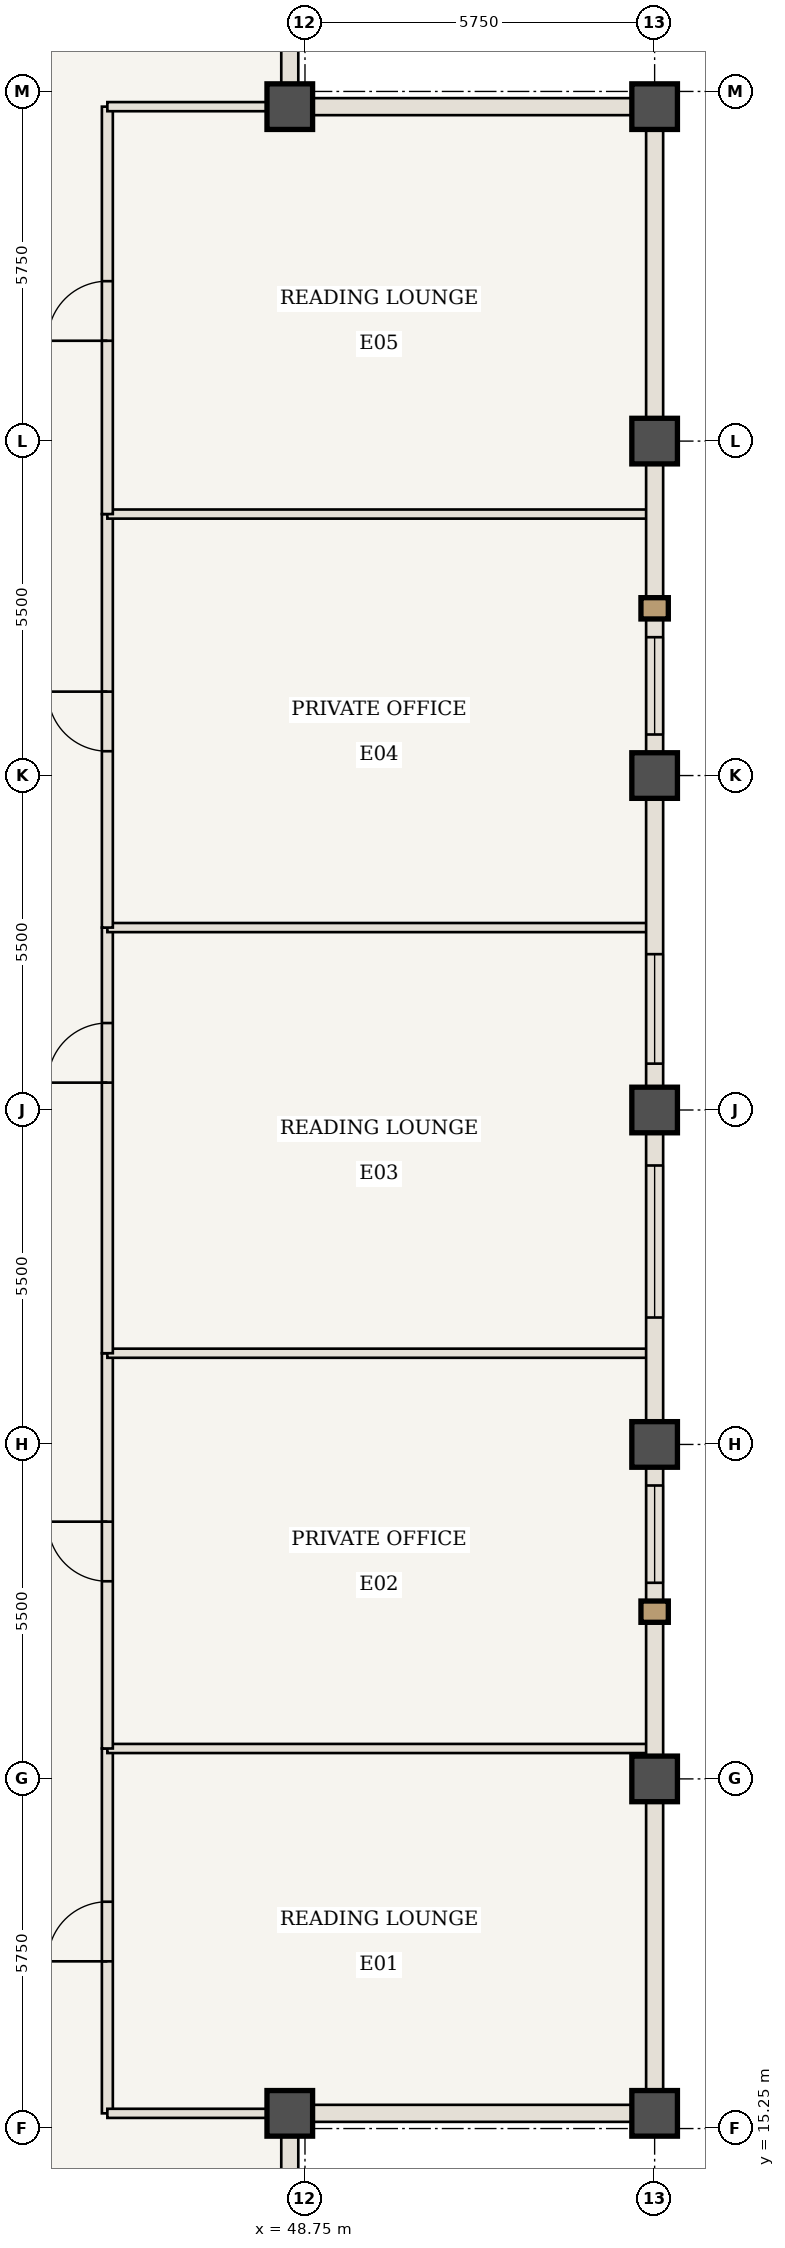
"""IFC4 building model, lengths in metres.
Left out: names, types, materials, properties, quantities, classifications, styles, units other than length and angle.
Written with IfcOpenShell. Run it as: python <this file> out.ifc"""

import sys

from ifc_helpers import new_model, si_unit, direction, frame, frame_2d, origin, origin_2d, place, context, subcontext, project, spatial, rectangle, extrude, element, fill, save


model = new_model("IFC4")
c1 = context("Model", 3, precision=1e-05, world=origin(), true_north=direction((0.0, 1.0)))
c2 = subcontext(c1, "Body", "Model", "MODEL_VIEW")
j1 = project(units=[si_unit("LENGTHUNIT", "METRE"), si_unit("PLANEANGLEUNIT", "RADIAN")], contexts=[c1])
p1 = place(None, origin())
s1 = spatial("IfcSite", under=j1, at=p1, CompositionType="ELEMENT")
p2 = place(p1, origin())
s2 = spatial("IfcBuilding", under=s1, at=p2, CompositionType="ELEMENT")
p3 = place(p2, frame((0.0, 0.0, 289.1)))
s3 = spatial("IfcBuildingStorey", under=s2, at=p3, CompositionType="ELEMENT", Elevation=289.1)
for number, where, z_axis, x_axis in (
    (1, (48.5, 15.5, 0.0), (0.0, 0.0, 1.0), (1.0, 0.0, 0.0)),
    (2, (54.5, 15.5, 0.0), (0.0, 0.0, 1.0), (1.0, 0.0, 0.0)),
    (3, (54.5, 48.5, 0.0), (0.0, 0.0, 1.0), (1.0, 0.0, 0.0)),
    (4, (48.5, 48.5, 0.0), (0.0, 0.0, 1.0), (1.0, 0.0, 0.0)),
    (5, (54.5, 21.0, 0.0), (0.0, 0.0, 1.0), (1.0, 0.0, 0.0)),
    (6, (54.5, 26.5, 0.0), (0.0, 0.0, 1.0), (1.0, 0.0, 0.0)),
    (7, (54.5, 32.0, 0.0), (0.0, 0.0, 1.0), (1.0, 0.0, 0.0)),
    (8, (54.5, 37.5, 0.0), (0.0, 0.0, 1.0), (1.0, 0.0, 0.0)),
    (9, (54.5, 43.0, 0.0), (0.0, 0.0, 1.0), (1.0, 0.0, 0.0)),
):
    element("IfcColumn", number, at=place(p3, frame(where, z_axis=z_axis, x_axis=x_axis)), inside=s3, PredefinedType="COLUMN", context=c2, shape_type="SweptSolid", body=[
        extrude(rectangle(XDim=0.75, YDim=0.75, at=origin_2d()), origin(), (0.0, 0.0, 1.0), 3.85),
    ])
p4 = place(p3, frame((45.5, 15.5, 0.0), z_axis=(0.0, 0.0, 1.0), x_axis=(0.0, 1.0, 0.0)))
e10 = element("IfcWall", 10, at=p4, inside=s3, PredefinedType="STANDARD", context=c2, shape_type="SweptSolid", body=[
    extrude(rectangle(XDim=6.0, YDim=0.18, at=frame_2d((3.0, 0.0))), origin(), (0.0, 0.0, 1.0), 3.685),
])
p5 = place(p4, frame((2.5, 0.0, 0.0)))
e11 = element("IfcOpeningElement", 11, at=p5, cuts=e10, PredefinedType="OPENING", context=c2, shape_type="SweptSolid", body=[
    extrude(rectangle(XDim=0.98, YDim=2.2, at=frame_2d((0.49, 1.1))), frame((0.0, 0.1, 0.0), z_axis=(0.0, -1.0, 0.0), x_axis=(1.0, 0.0, 0.0)), (0.0, 0.0, 1.0), 0.2),
])
p6 = place(p3, frame((45.5, 21.5, 0.0), z_axis=(0.0, 0.0, 1.0), x_axis=(1.0, 0.0, 0.0)))
e12 = element("IfcWall", 12, at=p6, inside=s3, PredefinedType="STANDARD", context=c2, shape_type="SweptSolid", body=[
    extrude(rectangle(XDim=8.94, YDim=0.15, at=frame_2d((4.47, 0.0))), origin(), (0.0, 0.0, 1.0), 3.685),
])
p7 = place(p3, frame((45.5, 21.5, 0.0), z_axis=(0.0, 0.0, 1.0), x_axis=(0.0, 1.0, 0.0)))
e13 = element("IfcWall", 13, at=p7, inside=s3, PredefinedType="STANDARD", context=c2, shape_type="SweptSolid", body=[
    extrude(rectangle(XDim=6.5, YDim=0.18, at=frame_2d((3.25, 0.0))), origin(), (0.0, 0.0, 1.0), 3.685),
])
p8 = place(p7, frame((2.75, 0.0, 0.0)))
e14 = element("IfcOpeningElement", 14, at=p8, cuts=e13, PredefinedType="OPENING", context=c2, shape_type="SweptSolid", body=[
    extrude(rectangle(XDim=0.98, YDim=2.2, at=frame_2d((0.49, 1.1))), frame((0.0, 0.1, 0.0), z_axis=(0.0, -1.0, 0.0), x_axis=(1.0, 0.0, 0.0)), (0.0, 0.0, 1.0), 0.2),
])
p9 = place(p3, frame((45.5, 28.0, 0.0), z_axis=(0.0, 0.0, 1.0), x_axis=(1.0, 0.0, 0.0)))
e15 = element("IfcWall", 15, at=p9, inside=s3, PredefinedType="STANDARD", context=c2, shape_type="SweptSolid", body=[
    extrude(rectangle(XDim=8.94, YDim=0.15, at=frame_2d((4.47, 0.0))), origin(), (0.0, 0.0, 1.0), 3.685),
])
p10 = place(p3, frame((45.5, 28.0, 0.0), z_axis=(0.0, 0.0, 1.0), x_axis=(0.0, 1.0, 0.0)))
e16 = element("IfcWall", 16, at=p10, inside=s3, PredefinedType="STANDARD", context=c2, shape_type="SweptSolid", body=[
    extrude(rectangle(XDim=7.0, YDim=0.18, at=frame_2d((3.5, 0.0))), origin(), (0.0, 0.0, 1.0), 3.685),
])
p11 = place(p10, frame((4.45, 0.0, 0.0)))
e17 = element("IfcOpeningElement", 17, at=p11, cuts=e16, PredefinedType="OPENING", context=c2, shape_type="SweptSolid", body=[
    extrude(rectangle(XDim=0.98, YDim=2.2, at=frame_2d((0.49, 1.1))), frame((0.0, 0.1, 0.0), z_axis=(0.0, -1.0, 0.0), x_axis=(1.0, 0.0, 0.0)), (0.0, 0.0, 1.0), 0.2),
])
p12 = place(p3, frame((45.5, 35.0, 0.0), z_axis=(0.0, 0.0, 1.0), x_axis=(1.0, 0.0, 0.0)))
e18 = element("IfcWall", 18, at=p12, inside=s3, PredefinedType="STANDARD", context=c2, shape_type="SweptSolid", body=[
    extrude(rectangle(XDim=8.94, YDim=0.15, at=frame_2d((4.47, 0.0))), origin(), (0.0, 0.0, 1.0), 3.685),
])
p13 = place(p3, frame((45.5, 35.0, 0.0), z_axis=(0.0, 0.0, 1.0), x_axis=(0.0, 1.0, 0.0)))
e19 = element("IfcWall", 19, at=p13, inside=s3, PredefinedType="STANDARD", context=c2, shape_type="SweptSolid", body=[
    extrude(rectangle(XDim=6.8, YDim=0.18, at=frame_2d((3.4, 0.0))), origin(), (0.0, 0.0, 1.0), 3.685),
])
p14 = place(p13, frame((2.9, 0.0, 0.0)))
e20 = element("IfcOpeningElement", 20, at=p14, cuts=e19, PredefinedType="OPENING", context=c2, shape_type="SweptSolid", body=[
    extrude(rectangle(XDim=0.98, YDim=2.2, at=frame_2d((0.49, 1.1))), frame((0.0, 0.1, 0.0), z_axis=(0.0, -1.0, 0.0), x_axis=(1.0, 0.0, 0.0)), (0.0, 0.0, 1.0), 0.2),
])
p15 = place(p3, frame((45.5, 41.8, 0.0), z_axis=(0.0, 0.0, 1.0), x_axis=(1.0, 0.0, 0.0)))
e21 = element("IfcWall", 21, at=p15, inside=s3, PredefinedType="STANDARD", context=c2, shape_type="SweptSolid", body=[
    extrude(rectangle(XDim=8.94, YDim=0.15, at=frame_2d((4.47, 0.0))), origin(), (0.0, 0.0, 1.0), 3.685),
])
p16 = place(p3, frame((45.5, 41.8, 0.0), z_axis=(0.0, 0.0, 1.0), x_axis=(0.0, 1.0, 0.0)))
e22 = element("IfcWall", 22, at=p16, inside=s3, PredefinedType="STANDARD", context=c2, shape_type="SweptSolid", body=[
    extrude(rectangle(XDim=6.7, YDim=0.18, at=frame_2d((3.35, 0.0))), origin(), (0.0, 0.0, 1.0), 3.685),
])
p17 = place(p16, frame((2.85, 0.0, 0.0)))
e23 = element("IfcOpeningElement", 23, at=p17, cuts=e22, PredefinedType="OPENING", context=c2, shape_type="SweptSolid", body=[
    extrude(rectangle(XDim=0.98, YDim=2.2, at=frame_2d((0.49, 1.1))), frame((0.0, 0.1, 0.0), z_axis=(0.0, -1.0, 0.0), x_axis=(1.0, 0.0, 0.0)), (0.0, 0.0, 1.0), 0.2),
])
for number, where, z_axis, x_axis in (
    (24, (45.5, 15.5, 0.0), (0.0, 0.0, 1.0), (1.0, 0.0, 0.0)),
    (25, (45.5, 48.5, 0.0), (0.0, 0.0, 1.0), (1.0, 0.0, 0.0)),
):
    element("IfcWall", number, at=place(p3, frame(where, z_axis=z_axis, x_axis=x_axis)), inside=s3, PredefinedType="STANDARD", context=c2, shape_type="SweptSolid", body=[
        extrude(rectangle(XDim=3.0, YDim=0.15, at=frame_2d((1.5, 0.0))), origin(), (0.0, 0.0, 1.0), 3.685),
    ])
p18 = place(p3, frame((54.5, 21.0, 0.0), z_axis=(0.0, 0.0, 1.0), x_axis=(0.0, -1.0, 0.0)))
e26 = element("IfcWall", 26, at=p18, inside=s3, PredefinedType="USERDEFINED", context=c2, shape_type="SweptSolid", body=[
    extrude(rectangle(XDim=5.5, YDim=0.28, at=frame_2d((2.75, 0.0))), origin(), (0.0, 0.0, 1.0), 2.985),
])
p19 = place(p3, frame((54.5, 26.5, 0.0), z_axis=(0.0, 0.0, 1.0), x_axis=(0.0, -1.0, 0.0)))
e27 = element("IfcWall", 27, at=p19, inside=s3, PredefinedType="USERDEFINED", context=c2, shape_type="SweptSolid", body=[
    extrude(rectangle(XDim=5.5, YDim=0.28, at=frame_2d((2.75, 0.0))), origin(), (0.0, 0.0, 1.0), 2.985),
])
p20 = place(p19, frame((0.675, 0.0, 0.85)))
e28 = element("IfcOpeningElement", 28, at=p20, cuts=e27, PredefinedType="OPENING", context=c2, shape_type="SweptSolid", body=[
    extrude(rectangle(XDim=1.6, YDim=1.935, at=frame_2d((0.8, 0.968))), frame((0.0, 0.15, 0.0), z_axis=(0.0, -1.0, 0.0), x_axis=(1.0, 0.0, 0.0)), (0.0, 0.0, 1.0), 0.3),
])
p21 = place(p3, frame((54.5, 32.0, 0.0), z_axis=(0.0, 0.0, 1.0), x_axis=(0.0, -1.0, 0.0)))
e29 = element("IfcWall", 29, at=p21, inside=s3, PredefinedType="USERDEFINED", context=c2, shape_type="SweptSolid", body=[
    extrude(rectangle(XDim=5.5, YDim=0.28, at=frame_2d((2.75, 0.0))), origin(), (0.0, 0.0, 1.0), 2.985),
])
p22 = place(p21, frame((0.913, 0.0, 0.85)))
e30 = element("IfcOpeningElement", 30, at=p22, cuts=e29, PredefinedType="OPENING", context=c2, shape_type="SweptSolid", body=[
    extrude(rectangle(XDim=2.5, YDim=1.935, at=frame_2d((1.25, 0.968))), frame((0.0, 0.15, 0.0), z_axis=(0.0, -1.0, 0.0), x_axis=(1.0, 0.0, 0.0)), (0.0, 0.0, 1.0), 0.3),
])
p23 = place(p3, frame((54.5, 37.5, 0.0), z_axis=(0.0, 0.0, 1.0), x_axis=(0.0, -1.0, 0.0)))
e31 = element("IfcWall", 31, at=p23, inside=s3, PredefinedType="USERDEFINED", context=c2, shape_type="SweptSolid", body=[
    extrude(rectangle(XDim=5.5, YDim=0.28, at=frame_2d((2.75, 0.0))), origin(), (0.0, 0.0, 1.0), 2.985),
])
p24 = place(p23, frame((2.938, 0.0, 0.85)))
e32 = element("IfcOpeningElement", 32, at=p24, cuts=e31, PredefinedType="OPENING", context=c2, shape_type="SweptSolid", body=[
    extrude(rectangle(XDim=1.8, YDim=1.935, at=frame_2d((0.9, 0.968))), frame((0.0, 0.15, 0.0), z_axis=(0.0, -1.0, 0.0), x_axis=(1.0, 0.0, 0.0)), (0.0, 0.0, 1.0), 0.3),
])
p25 = place(p3, frame((54.5, 43.0, 0.0), z_axis=(0.0, 0.0, 1.0), x_axis=(0.0, -1.0, 0.0)))
e33 = element("IfcWall", 33, at=p25, inside=s3, PredefinedType="USERDEFINED", context=c2, shape_type="SweptSolid", body=[
    extrude(rectangle(XDim=5.5, YDim=0.28, at=frame_2d((2.75, 0.0))), origin(), (0.0, 0.0, 1.0), 2.985),
])
p26 = place(p25, frame((3.225, 0.0, 0.85)))
e34 = element("IfcOpeningElement", 34, at=p26, cuts=e33, PredefinedType="OPENING", context=c2, shape_type="SweptSolid", body=[
    extrude(rectangle(XDim=1.6, YDim=1.935, at=frame_2d((0.8, 0.968))), frame((0.0, 0.15, 0.0), z_axis=(0.0, -1.0, 0.0), x_axis=(1.0, 0.0, 0.0)), (0.0, 0.0, 1.0), 0.3),
])
p27 = place(p3, frame((54.5, 48.5, 0.0), z_axis=(0.0, 0.0, 1.0), x_axis=(0.0, -1.0, 0.0)))
e35 = element("IfcWall", 35, at=p27, inside=s3, PredefinedType="USERDEFINED", context=c2, shape_type="SweptSolid", body=[
    extrude(rectangle(XDim=5.5, YDim=0.28, at=frame_2d((2.75, 0.0))), origin(), (0.0, 0.0, 1.0), 2.985),
])
for number, where, z_axis, x_axis in (
    (36, (48.5, 15.5, 0.0), (0.0, 0.0, 1.0), (0.0, -1.0, 0.0)),
    (37, (54.5, 15.5, 0.0), (0.0, 0.0, 1.0), (-1.0, 0.0, 0.0)),
    (38, (48.5, 48.5, 0.0), (0.0, 0.0, 1.0), (1.0, 0.0, 0.0)),
    (39, (48.5, 54.5, 0.0), (0.0, 0.0, 1.0), (0.0, -1.0, 0.0)),
):
    element("IfcWall", number, at=place(p3, frame(where, z_axis=z_axis, x_axis=x_axis)), inside=s3, PredefinedType="USERDEFINED", context=c2, shape_type="SweptSolid", body=[
        extrude(rectangle(XDim=6.0, YDim=0.28, at=frame_2d((3.0, 0.0))), origin(), (0.0, 0.0, 1.0), 2.985),
    ])
p28 = place(p5, origin())
e40 = element("IfcDoor", 40, at=p28, inside=s3, OperationType="SINGLE_SWING_LEFT", PredefinedType="DOOR", context=c2, shape_type="SweptSolid", body=[
    extrude(rectangle(XDim=0.98, YDim=2.2, at=frame_2d((0.49, 1.1))), frame((0.0, 0.025, 0.0), z_axis=(0.0, -1.0, 0.0), x_axis=(1.0, 0.0, 0.0)), (0.0, 0.0, 1.0), 0.05),
])
fill(e11, e40)
p29 = place(p8, origin())
e41 = element("IfcDoor", 41, at=p29, inside=s3, OperationType="SINGLE_SWING_RIGHT", PredefinedType="DOOR", context=c2, shape_type="SweptSolid", body=[
    extrude(rectangle(XDim=0.98, YDim=2.2, at=frame_2d((0.49, 1.1))), frame((0.0, 0.025, 0.0), z_axis=(0.0, -1.0, 0.0), x_axis=(1.0, 0.0, 0.0)), (0.0, 0.0, 1.0), 0.05),
])
fill(e14, e41)
p30 = place(p11, origin())
e42 = element("IfcDoor", 42, at=p30, inside=s3, OperationType="SINGLE_SWING_LEFT", PredefinedType="DOOR", context=c2, shape_type="SweptSolid", body=[
    extrude(rectangle(XDim=0.98, YDim=2.2, at=frame_2d((0.49, 1.1))), frame((0.0, 0.025, 0.0), z_axis=(0.0, -1.0, 0.0), x_axis=(1.0, 0.0, 0.0)), (0.0, 0.0, 1.0), 0.05),
])
fill(e17, e42)
p31 = place(p14, origin())
e43 = element("IfcDoor", 43, at=p31, inside=s3, OperationType="SINGLE_SWING_RIGHT", PredefinedType="DOOR", context=c2, shape_type="SweptSolid", body=[
    extrude(rectangle(XDim=0.98, YDim=2.2, at=frame_2d((0.49, 1.1))), frame((0.0, 0.025, 0.0), z_axis=(0.0, -1.0, 0.0), x_axis=(1.0, 0.0, 0.0)), (0.0, 0.0, 1.0), 0.05),
])
fill(e20, e43)
p32 = place(p17, origin())
e44 = element("IfcDoor", 44, at=p32, inside=s3, OperationType="SINGLE_SWING_LEFT", PredefinedType="DOOR", context=c2, shape_type="SweptSolid", body=[
    extrude(rectangle(XDim=0.98, YDim=2.2, at=frame_2d((0.49, 1.1))), frame((0.0, 0.025, 0.0), z_axis=(0.0, -1.0, 0.0), x_axis=(1.0, 0.0, 0.0)), (0.0, 0.0, 1.0), 0.05),
])
fill(e23, e44)
p33 = place(p20, origin())
e45 = element("IfcWindow", 45, at=p33, inside=s3, PartitioningType="SINGLE_PANEL", PredefinedType="WINDOW", context=c2, shape_type="SweptSolid", body=[
    extrude(rectangle(XDim=1.6, YDim=1.935, at=frame_2d((0.8, 0.968))), frame((0.0, 0.03, 0.0), z_axis=(0.0, -1.0, 0.0), x_axis=(1.0, 0.0, 0.0)), (0.0, 0.0, 1.0), 0.06),
])
fill(e28, e45)
p34 = place(p22, origin())
e46 = element("IfcWindow", 46, at=p34, inside=s3, PartitioningType="SINGLE_PANEL", PredefinedType="WINDOW", context=c2, shape_type="SweptSolid", body=[
    extrude(rectangle(XDim=2.5, YDim=1.935, at=frame_2d((1.25, 0.968))), frame((0.0, 0.03, 0.0), z_axis=(0.0, -1.0, 0.0), x_axis=(1.0, 0.0, 0.0)), (0.0, 0.0, 1.0), 0.06),
])
fill(e30, e46)
p35 = place(p24, origin())
e47 = element("IfcWindow", 47, at=p35, inside=s3, PartitioningType="SINGLE_PANEL", PredefinedType="WINDOW", context=c2, shape_type="SweptSolid", body=[
    extrude(rectangle(XDim=1.8, YDim=1.935, at=frame_2d((0.9, 0.968))), frame((0.0, 0.03, 0.0), z_axis=(0.0, -1.0, 0.0), x_axis=(1.0, 0.0, 0.0)), (0.0, 0.0, 1.0), 0.06),
])
fill(e32, e47)
p36 = place(p26, origin())
e48 = element("IfcWindow", 48, at=p36, inside=s3, PartitioningType="SINGLE_PANEL", PredefinedType="WINDOW", context=c2, shape_type="SweptSolid", body=[
    extrude(rectangle(XDim=1.6, YDim=1.935, at=frame_2d((0.8, 0.968))), frame((0.0, 0.03, 0.0), z_axis=(0.0, -1.0, 0.0), x_axis=(1.0, 0.0, 0.0)), (0.0, 0.0, 1.0), 0.06),
])
fill(e34, e48)
save(model, sys.argv[1])
